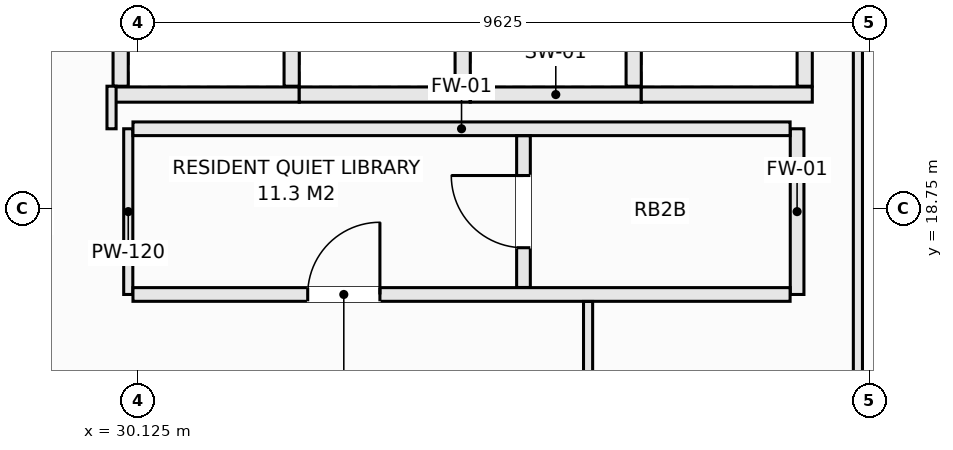
"""IFC4 building model, lengths in metres.
Left out: names, types, materials, properties, quantities, classifications, styles, units other than length and angle.
Written with IfcOpenShell. Run it as: python <this file> out.ifc"""

import sys

from ifc_helpers import new_model, si_unit, direction, frame, frame_2d, origin, place, context, subcontext, project, spatial, rectangle, extrude, element, fill, save


model = new_model("IFC4")
c1 = context("Model", 3, precision=1e-05, world=origin(), true_north=direction((0.0, 1.0)))
c2 = subcontext(c1, "Body", "Model", "MODEL_VIEW")
j1 = project(units=[si_unit("LENGTHUNIT", "METRE"), si_unit("PLANEANGLEUNIT", "RADIAN")], contexts=[c1])
p1 = place(None, origin())
s1 = spatial("IfcSite", under=j1, at=p1, CompositionType="ELEMENT")
p2 = place(p1, origin())
s2 = spatial("IfcBuilding", under=s1, at=p2, CompositionType="ELEMENT")
p3 = place(p2, frame((0.0, 0.0, 229.4)))
s3 = spatial("IfcBuildingStorey", under=s2, at=p3, CompositionType="ELEMENT", Elevation=229.4)
p4 = place(p3, frame((29.8, 20.25, 0.0), z_axis=(0.0, 0.0, 1.0), x_axis=(1.0, 0.0, 0.0)))
e1 = element("IfcWall", 1, at=p4, inside=s3, PredefinedType="SOLIDWALL", context=c2, shape_type="SweptSolid", body=[
    extrude(rectangle(XDim=2.45, YDim=0.2, at=frame_2d((1.225, 0.0))), origin(), (0.0, 0.0, 1.0), 3.03),
])
for number, where, z_axis, x_axis in (
    (2, (29.9, 20.36, 0.0), (0.0, 0.0, 1.0), (0.0, 1.0, 0.0)),
    (3, (32.15, 20.36, 0.0), (0.0, 0.0, 1.0), (0.0, 1.0, 0.0)),
):
    element("IfcWall", number, at=place(p3, frame(where, z_axis=z_axis, x_axis=x_axis)), inside=s3, PredefinedType="SOLIDWALL", context=c2, shape_type="SweptSolid", body=[
        extrude(rectangle(XDim=2.43, YDim=0.2, at=frame_2d((1.215, 0.0))), origin(), (0.0, 0.0, 1.0), 3.03),
    ])
p5 = place(p3, frame((32.25, 20.25, 0.0), z_axis=(0.0, 0.0, 1.0), x_axis=(1.0, 0.0, 0.0)))
e4 = element("IfcWall", 4, at=p5, inside=s3, PredefinedType="SOLIDWALL", context=c2, shape_type="SweptSolid", body=[
    extrude(rectangle(XDim=2.25, YDim=0.2, at=frame_2d((1.125, 0.0))), origin(), (0.0, 0.0, 1.0), 3.03),
])
p6 = place(p3, frame((34.4, 20.36, 0.0), z_axis=(0.0, 0.0, 1.0), x_axis=(0.0, 1.0, 0.0)))
e5 = element("IfcWall", 5, at=p6, inside=s3, PredefinedType="SOLIDWALL", context=c2, shape_type="SweptSolid", body=[
    extrude(rectangle(XDim=2.43, YDim=0.2, at=frame_2d((1.215, 0.0))), origin(), (0.0, 0.0, 1.0), 3.03),
])
p7 = place(p3, frame((34.5, 20.25, 0.0), z_axis=(0.0, 0.0, 1.0), x_axis=(1.0, 0.0, 0.0)))
e6 = element("IfcWall", 6, at=p7, inside=s3, PredefinedType="SOLIDWALL", context=c2, shape_type="SweptSolid", body=[
    extrude(rectangle(XDim=2.25, YDim=0.2, at=frame_2d((1.125, 0.0))), origin(), (0.0, 0.0, 1.0), 3.03),
])
p8 = place(p3, frame((36.65, 20.36, 0.0), z_axis=(0.0, 0.0, 1.0), x_axis=(0.0, 1.0, 0.0)))
e7 = element("IfcWall", 7, at=p8, inside=s3, PredefinedType="SOLIDWALL", context=c2, shape_type="SweptSolid", body=[
    extrude(rectangle(XDim=2.43, YDim=0.2, at=frame_2d((1.215, 0.0))), origin(), (0.0, 0.0, 1.0), 3.03),
])
p9 = place(p3, frame((36.75, 20.25, 0.0), z_axis=(0.0, 0.0, 1.0), x_axis=(1.0, 0.0, 0.0)))
e8 = element("IfcWall", 8, at=p9, inside=s3, PredefinedType="SOLIDWALL", context=c2, shape_type="SweptSolid", body=[
    extrude(rectangle(XDim=2.25, YDim=0.2, at=frame_2d((1.125, 0.0))), origin(), (0.0, 0.0, 1.0), 3.03),
])
p10 = place(p3, frame((38.9, 20.36, 0.0), z_axis=(0.0, 0.0, 1.0), x_axis=(0.0, 1.0, 0.0)))
e9 = element("IfcWall", 9, at=p10, inside=s3, PredefinedType="SOLIDWALL", context=c2, shape_type="SweptSolid", body=[
    extrude(rectangle(XDim=2.43, YDim=0.2, at=frame_2d((1.215, 0.0))), origin(), (0.0, 0.0, 1.0), 3.03),
])
p11 = place(p3, frame((30.0, 17.62, 0.0), z_axis=(0.0, 0.0, 1.0), x_axis=(0.0, 1.0, 0.0)))
e10 = element("IfcWall", 10, at=p11, inside=s3, PredefinedType="PARTITIONING", context=c2, shape_type="SweptSolid", body=[
    extrude(rectangle(XDim=2.18, YDim=0.12, at=frame_2d((1.09, 0.0))), origin(), (0.0, 0.0, 1.0), 3.03),
])
p12 = place(p3, frame((38.8, 17.62, 0.0), z_axis=(0.0, 0.0, 1.0), x_axis=(0.0, 1.0, 0.0)))
e11 = element("IfcWall", 11, at=p12, inside=s3, PredefinedType="SOLIDWALL", context=c2, shape_type="SweptSolid", body=[
    extrude(rectangle(XDim=2.18, YDim=0.18, at=frame_2d((1.09, 0.0))), origin(), (0.0, 0.0, 1.0), 3.03),
])
p13 = place(p3, frame((30.062, 17.62, 0.0), z_axis=(0.0, 0.0, 1.0), x_axis=(1.0, 0.0, 0.0)))
e12 = element("IfcWall", 12, at=p13, inside=s3, PredefinedType="SOLIDWALL", context=c2, shape_type="SweptSolid", body=[
    extrude(rectangle(XDim=8.646, YDim=0.18, at=frame_2d((4.323, 0.0))), origin(), (0.0, 0.0, 1.0), 3.03),
])
p14 = place(p13, frame((2.299, 0.0, 0.0)))
e13 = element("IfcOpeningElement", 13, at=p14, cuts=e12, PredefinedType="OPENING", context=c2, shape_type="SweptSolid", body=[
    extrude(rectangle(XDim=0.95, YDim=2.1, at=frame_2d((0.475, 1.05))), frame((0.0, 0.1, 0.0), z_axis=(0.0, -1.0, 0.0), x_axis=(1.0, 0.0, 0.0)), (0.0, 0.0, 1.0), 0.2),
])
p15 = place(p3, frame((30.062, 19.8, 0.0), z_axis=(0.0, 0.0, 1.0), x_axis=(1.0, 0.0, 0.0)))
e14 = element("IfcWall", 14, at=p15, inside=s3, PredefinedType="SOLIDWALL", context=c2, shape_type="SweptSolid", body=[
    extrude(rectangle(XDim=8.646, YDim=0.18, at=frame_2d((4.323, 0.0))), origin(), (0.0, 0.0, 1.0), 3.03),
])
p16 = place(p3, frame((35.2, 17.712, 0.0), z_axis=(0.0, 0.0, 1.0), x_axis=(0.0, 1.0, 0.0)))
e15 = element("IfcWall", 15, at=p16, inside=s3, PredefinedType="SOLIDWALL", context=c2, shape_type="SweptSolid", body=[
    extrude(rectangle(XDim=1.996, YDim=0.18, at=frame_2d((0.998, 0.0))), origin(), (0.0, 0.0, 1.0), 3.03),
])
p17 = place(p16, frame((0.523, 0.0, 0.0)))
e16 = element("IfcOpeningElement", 16, at=p17, cuts=e15, PredefinedType="OPENING", context=c2, shape_type="SweptSolid", body=[
    extrude(rectangle(XDim=0.95, YDim=2.1, at=frame_2d((0.475, 1.05))), frame((0.0, 0.1, 0.0), z_axis=(0.0, -1.0, 0.0), x_axis=(1.0, 0.0, 0.0)), (0.0, 0.0, 1.0), 0.2),
])
p18 = place(p3, frame((39.6, 16.5, 0.0), z_axis=(0.0, 0.0, 1.0), x_axis=(0.0, 1.0, 0.0)))
e17 = element("IfcWall", 17, at=p18, inside=s3, PredefinedType="PARTITIONING", context=c2, shape_type="SweptSolid", body=[
    extrude(rectangle(XDim=6.52, YDim=0.12, at=frame_2d((3.26, 0.0))), origin(), (0.0, 0.0, 1.0), 2.478),
])
p19 = place(p3, frame((29.78, 19.8, 0.0), z_axis=(0.0, 0.0, 1.0), x_axis=(0.0, 1.0, 0.0)))
e18 = element("IfcWall", 18, at=p19, inside=s3, PredefinedType="PARTITIONING", context=c2, shape_type="SweptSolid", body=[
    extrude(rectangle(XDim=0.56, YDim=0.12, at=frame_2d((0.28, 0.0))), origin(), (0.0, 0.0, 1.0), 3.03),
])
p20 = place(p3, frame((36.05, 14.95, 0.0), z_axis=(0.0, 0.0, 1.0), x_axis=(0.0, 1.0, 0.0)))
e19 = element("IfcWall", 19, at=p20, inside=s3, PredefinedType="PARTITIONING", context=c2, shape_type="SweptSolid", body=[
    extrude(rectangle(XDim=2.578, YDim=0.12, at=frame_2d((1.289, 0.0))), origin(), (0.0, 0.0, 1.0), 3.03),
])
p21 = place(p14, origin())
e20 = element("IfcDoor", 20, at=p21, inside=s3, OperationType="SINGLE_SWING_RIGHT", PredefinedType="DOOR", context=c2, shape_type="SweptSolid", body=[
    extrude(rectangle(XDim=0.95, YDim=2.1, at=frame_2d((0.475, 1.05))), frame((0.0, 0.025, 0.0), z_axis=(0.0, -1.0, 0.0), x_axis=(1.0, 0.0, 0.0)), (0.0, 0.0, 1.0), 0.05),
])
fill(e13, e20)
p22 = place(p17, origin())
e21 = element("IfcDoor", 21, at=p22, inside=s3, OperationType="SINGLE_SWING_RIGHT", PredefinedType="DOOR", context=c2, shape_type="SweptSolid", body=[
    extrude(rectangle(XDim=0.95, YDim=2.1, at=frame_2d((0.475, 1.05))), frame((0.0, 0.025, 0.0), z_axis=(0.0, -1.0, 0.0), x_axis=(1.0, 0.0, 0.0)), (0.0, 0.0, 1.0), 0.05),
])
fill(e16, e21)
save(model, sys.argv[1])
